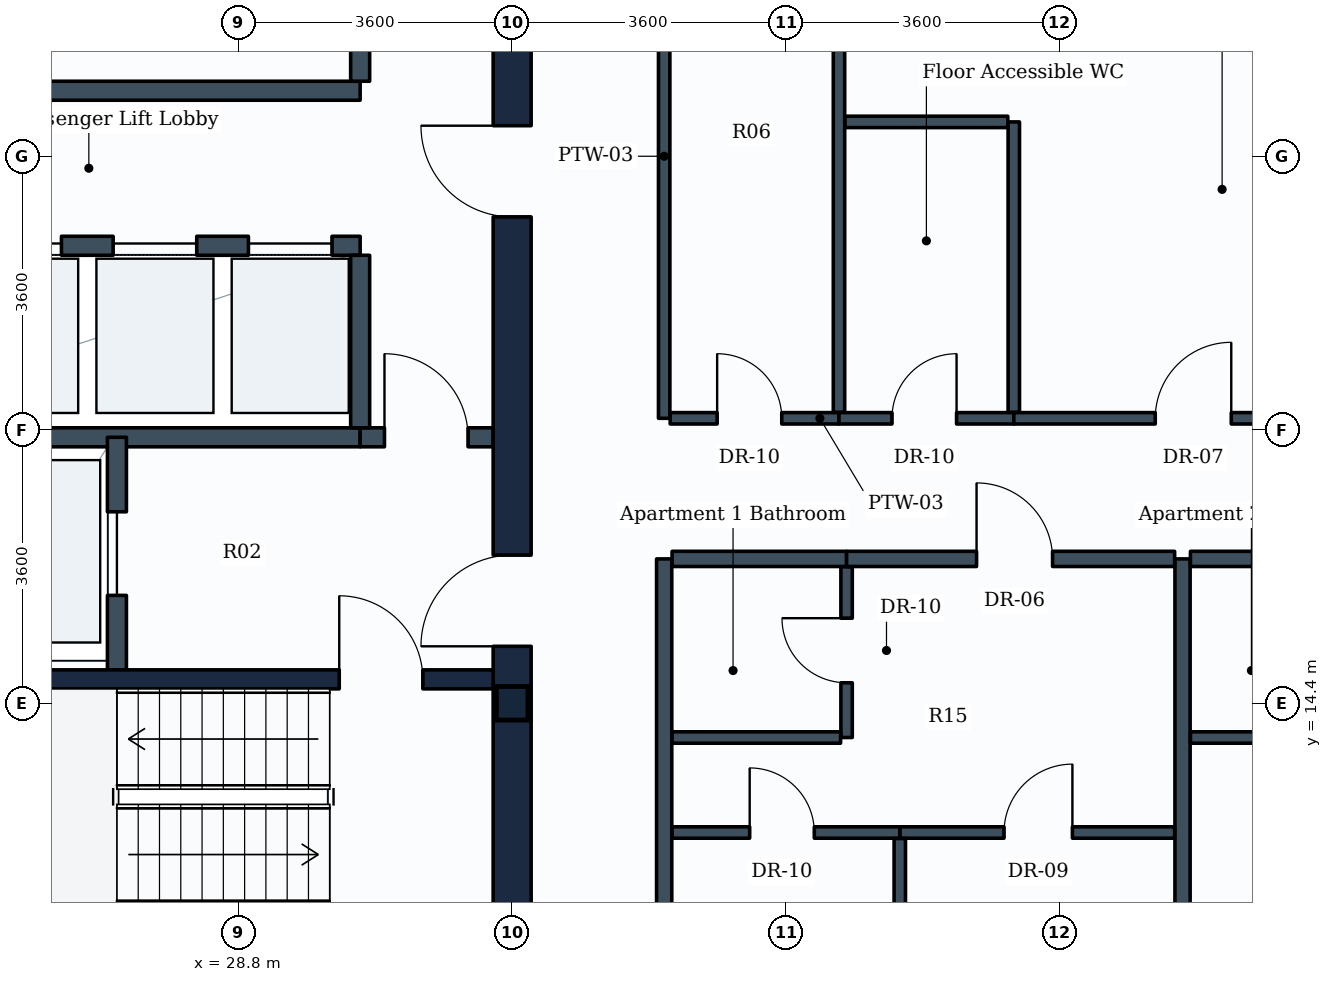
"""IFC4 building model, lengths in metres.
Left out: names, types, materials, properties, quantities, classifications, styles, units other than length and angle.
Written with IfcOpenShell. Run it as: python <this file> out.ifc"""

import sys

from ifc_helpers import new_model, si_unit, direction, frame, frame_2d, origin, origin_2d, place, context, subcontext, project, spatial, rectangle, i_section, extrude, element, fill, save


model = new_model("IFC4")
c1 = context("Model", 3, precision=1e-05, world=origin(), true_north=direction((0.0, 1.0)))
c2 = subcontext(c1, "Body", "Model", "MODEL_VIEW")
j1 = project(units=[si_unit("LENGTHUNIT", "METRE"), si_unit("PLANEANGLEUNIT", "RADIAN")], contexts=[c1])
p1 = place(None, origin())
s1 = spatial("IfcSite", under=j1, at=p1, CompositionType="ELEMENT")
p2 = place(p1, origin())
s2 = spatial("IfcBuilding", under=s1, at=p2, CompositionType="ELEMENT")
p3 = place(p2, frame((0.0, 0.0, 135.2)))
s3 = spatial("IfcBuildingStorey", under=s2, at=p3, CompositionType="ELEMENT", Elevation=135.2)
p4 = place(p3, frame((32.4, 14.4, 0.0), z_axis=(0.0, 0.0, 1.0), x_axis=(1.0, 0.0, 0.0)))
e1 = element("IfcColumn", 1, at=p4, inside=s3, PredefinedType="COLUMN", context=c2, shape_type="SweptSolid", body=[
    extrude(i_section(OverallWidth=0.416, OverallDepth=0.442, WebThickness=0.025, FlangeThickness=0.041, FilletRadius=0.015, at=origin_2d()), origin(), (0.0, 0.0, 1.0), 3.8),
])
p5 = place(p3, frame((32.4, 10.8, 0.0), z_axis=(0.0, 0.0, 1.0), x_axis=(0.0, 1.0, 0.0)))
e2 = element("IfcWall", 2, at=p5, inside=s3, PredefinedType="SHEAR", context=c2, shape_type="SweptSolid", body=[
    extrude(rectangle(XDim=14.4, YDim=0.5, at=frame_2d((7.2, 0.0))), origin(), (0.0, 0.0, 1.0), 3.55),
])
p6 = place(p5, frame((4.35, 0.0, 0.0)))
e3 = element("IfcOpeningElement", 3, at=p6, cuts=e2, PredefinedType="OPENING", context=c2, shape_type="SweptSolid", body=[
    extrude(rectangle(XDim=1.2, YDim=2.1, at=frame_2d((0.6, 1.05))), frame((0.0, 0.26, 0.0), z_axis=(0.0, -1.0, 0.0), x_axis=(1.0, 0.0, 0.0)), (0.0, 0.0, 1.0), 0.52),
])
p7 = place(p5, frame((10.0, 0.0, 0.0)))
e4 = element("IfcOpeningElement", 4, at=p7, cuts=e2, PredefinedType="OPENING", context=c2, shape_type="SweptSolid", body=[
    extrude(rectangle(XDim=1.2, YDim=2.1, at=frame_2d((0.6, 1.05))), frame((0.0, 0.26, 0.0), z_axis=(0.0, -1.0, 0.0), x_axis=(1.0, 0.0, 0.0)), (0.0, 0.0, 1.0), 0.52),
])
p8 = place(p3, frame((23.35, 14.715, 0.0), z_axis=(0.0, 0.0, 1.0), x_axis=(1.0, 0.0, 0.0)))
e5 = element("IfcWall", 5, at=p8, inside=s3, PredefinedType="SHEAR", context=c2, shape_type="SweptSolid", body=[
    extrude(rectangle(XDim=8.8, YDim=0.25, at=frame_2d((4.4, 0.0))), origin(), (0.0, 0.0, 1.0), 3.55),
])
p9 = place(p8, frame((6.775, 0.0, 0.0)))
e6 = element("IfcOpeningElement", 6, at=p9, cuts=e5, PredefinedType="OPENING", context=c2, shape_type="SweptSolid", body=[
    extrude(rectangle(XDim=1.1, YDim=2.1, at=frame_2d((0.55, 1.05))), frame((0.0, 0.135, 0.0), z_axis=(0.0, -1.0, 0.0), x_axis=(1.0, 0.0, 0.0)), (0.0, 0.0, 1.0), 0.27),
])
p10 = place(p3, frame((21.88, 17.9, 0.0), z_axis=(0.0, 0.0, 1.0), x_axis=(1.0, 0.0, 0.0)))
e7 = element("IfcWall", 7, at=p10, inside=s3, PredefinedType="PARTITIONING", context=c2, shape_type="SweptSolid", body=[
    extrude(rectangle(XDim=8.52, YDim=0.25, at=frame_2d((4.26, 0.0))), origin(), (0.0, 0.0, 1.0), 3.535),
])
p11 = place(p3, frame((30.4, 17.9, 0.0), z_axis=(0.0, 0.0, 1.0), x_axis=(1.0, 0.0, 0.0)))
e8 = element("IfcWall", 8, at=p11, inside=s3, PredefinedType="PARTITIONING", context=c2, shape_type="SweptSolid", body=[
    extrude(rectangle(XDim=1.75, YDim=0.25, at=frame_2d((0.875, 0.0))), origin(), (0.0, 0.0, 1.0), 3.535),
])
p12 = place(p11, frame((0.32, 0.0, 0.0)))
e9 = element("IfcOpeningElement", 9, at=p12, cuts=e8, PredefinedType="OPENING", context=c2, shape_type="SweptSolid", body=[
    extrude(rectangle(XDim=1.1, YDim=2.1, at=frame_2d((0.55, 1.05))), frame((0.0, 0.135, 0.0), z_axis=(0.0, -1.0, 0.0), x_axis=(1.0, 0.0, 0.0)), (0.0, 0.0, 1.0), 0.27),
])
p13 = place(p3, frame((27.2, 14.84, 0.0), z_axis=(0.0, 0.0, 1.0), x_axis=(0.0, 1.0, 0.0)))
e10 = element("IfcWall", 10, at=p13, inside=s3, PredefinedType="PARTITIONING", context=c2, shape_type="SweptSolid", body=[
    extrude(rectangle(XDim=3.06, YDim=0.25, at=frame_2d((1.53, 0.0))), origin(), (0.0, 0.0, 1.0), 3.535),
])
p14 = place(p13, frame((0.98, 0.0, 0.0)))
e11 = element("IfcOpeningElement", 11, at=p14, cuts=e10, PredefinedType="OPENING", context=c2, shape_type="SweptSolid", body=[
    extrude(rectangle(XDim=1.1, YDim=2.1, at=frame_2d((0.55, 1.05))), frame((0.0, 0.135, 0.0), z_axis=(0.0, -1.0, 0.0), x_axis=(1.0, 0.0, 0.0)), (0.0, 0.0, 1.0), 0.27),
])
p15 = place(p3, frame((23.18, 20.42, 0.0), z_axis=(0.0, 0.0, 1.0), x_axis=(1.0, 0.0, 0.0)))
e12 = element("IfcWall", 12, at=p15, inside=s3, PredefinedType="PARTITIONING", context=c2, shape_type="SweptSolid", body=[
    extrude(rectangle(XDim=7.22, YDim=0.25, at=frame_2d((3.61, 0.0))), origin(), (0.0, 0.0, 1.0), 3.535),
])
p16 = place(p15, frame((0.41, 0.0, 0.0)))
e13 = element("IfcOpeningElement", 13, at=p16, cuts=e12, PredefinedType="OPENING", context=c2, shape_type="SweptSolid", body=[
    extrude(rectangle(XDim=1.1, YDim=2.1, at=frame_2d((0.55, 1.05))), frame((0.0, 0.135, 0.0), z_axis=(0.0, -1.0, 0.0), x_axis=(1.0, 0.0, 0.0)), (0.0, 0.0, 1.0), 0.27),
])
p17 = place(p15, frame((2.19, 0.0, 0.0)))
e14 = element("IfcOpeningElement", 14, at=p17, cuts=e12, PredefinedType="OPENING", context=c2, shape_type="SweptSolid", body=[
    extrude(rectangle(XDim=1.1, YDim=2.1, at=frame_2d((0.55, 1.05))), frame((0.0, 0.135, 0.0), z_axis=(0.0, -1.0, 0.0), x_axis=(1.0, 0.0, 0.0)), (0.0, 0.0, 1.0), 0.27),
])
p18 = place(p15, frame((3.97, 0.0, 0.0)))
e15 = element("IfcOpeningElement", 15, at=p18, cuts=e12, PredefinedType="OPENING", context=c2, shape_type="SweptSolid", body=[
    extrude(rectangle(XDim=1.1, YDim=2.1, at=frame_2d((0.55, 1.05))), frame((0.0, 0.135, 0.0), z_axis=(0.0, -1.0, 0.0), x_axis=(1.0, 0.0, 0.0)), (0.0, 0.0, 1.0), 0.27),
])
p19 = place(p15, frame((5.75, 0.0, 0.0)))
e16 = element("IfcOpeningElement", 16, at=p19, cuts=e12, PredefinedType="OPENING", context=c2, shape_type="SweptSolid", body=[
    extrude(rectangle(XDim=1.1, YDim=2.1, at=frame_2d((0.55, 1.05))), frame((0.0, 0.135, 0.0), z_axis=(0.0, -1.0, 0.0), x_axis=(1.0, 0.0, 0.0)), (0.0, 0.0, 1.0), 0.27),
])
p20 = place(p3, frame((30.4, 18.025, 0.0), z_axis=(0.0, 0.0, 1.0), x_axis=(0.0, 1.0, 0.0)))
e17 = element("IfcWall", 17, at=p20, inside=s3, PredefinedType="PARTITIONING", context=c2, shape_type="SweptSolid", body=[
    extrude(rectangle(XDim=2.27, YDim=0.25, at=frame_2d((1.135, 0.0))), origin(), (0.0, 0.0, 1.0), 3.535),
])
p21 = place(p3, frame((23.18, 22.46, 0.0), z_axis=(0.0, 0.0, 1.0), x_axis=(1.0, 0.0, 0.0)))
e18 = element("IfcWall", 18, at=p21, inside=s3, PredefinedType="PARTITIONING", context=c2, shape_type="SweptSolid", body=[
    extrude(rectangle(XDim=7.22, YDim=0.25, at=frame_2d((3.61, 0.0))), origin(), (0.0, 0.0, 1.0), 3.535),
])
p22 = place(p3, frame((30.4, 22.585, 0.0), z_axis=(0.0, 0.0, 1.0), x_axis=(0.0, 1.0, 0.0)))
e19 = element("IfcWall", 19, at=p22, inside=s3, PredefinedType="PARTITIONING", context=c2, shape_type="SweptSolid", body=[
    extrude(rectangle(XDim=2.315, YDim=0.25, at=frame_2d((1.157, 0.0))), origin(), (0.0, 0.0, 1.0), 3.535),
])
p23 = place(p3, frame((34.4, 18.15, 0.0), z_axis=(0.0, 0.0, 1.0), x_axis=(0.0, 1.0, 0.0)))
e20 = element("IfcWall", 20, at=p23, inside=s3, PredefinedType="PARTITIONING", context=c2, shape_type="SweptSolid", body=[
    extrude(rectangle(XDim=6.896, YDim=0.15, at=frame_2d((3.448, 0.0))), origin(), (0.0, 0.0, 1.0), 2.93),
])
p24 = place(p3, frame((34.479, 18.15, 0.0), z_axis=(0.0, 0.0, 1.0), x_axis=(1.0, 0.0, 0.0)))
e21 = element("IfcWall", 21, at=p24, inside=s3, PredefinedType="PARTITIONING", context=c2, shape_type="SweptSolid", body=[
    extrude(rectangle(XDim=2.221, YDim=0.15, at=frame_2d((1.11, 0.0))), origin(), (0.0, 0.0, 1.0), 3.08),
])
p25 = place(p24, frame((0.618, 0.0, 0.0)))
e22 = element("IfcOpeningElement", 22, at=p25, cuts=e21, PredefinedType="OPENING", context=c2, shape_type="SweptSolid", body=[
    extrude(rectangle(XDim=0.85, YDim=2.1, at=frame_2d((0.425, 1.05))), frame((0.0, 0.085, 0.0), z_axis=(0.0, -1.0, 0.0), x_axis=(1.0, 0.0, 0.0)), (0.0, 0.0, 1.0), 0.17),
])
p26 = place(p3, frame((36.7, 18.229, 0.0), z_axis=(0.0, 0.0, 1.0), x_axis=(0.0, 1.0, 0.0)))
e23 = element("IfcWall", 23, at=p26, inside=s3, PredefinedType="PARTITIONING", context=c2, shape_type="SweptSolid", body=[
    extrude(rectangle(XDim=6.817, YDim=0.15, at=frame_2d((3.408, 0.0))), origin(), (0.0, 0.0, 1.0), 2.93),
])
p27 = place(p3, frame((36.7, 18.15, 0.0), z_axis=(0.0, 0.0, 1.0), x_axis=(1.0, 0.0, 0.0)))
e24 = element("IfcWall", 24, at=p27, inside=s3, PredefinedType="PARTITIONING", context=c2, shape_type="SweptSolid", body=[
    extrude(rectangle(XDim=2.3, YDim=0.15, at=frame_2d((1.15, 0.0))), origin(), (0.0, 0.0, 1.0), 3.08),
])
p28 = place(p27, frame((0.697, 0.0, 0.0)))
e25 = element("IfcOpeningElement", 25, at=p28, cuts=e24, PredefinedType="OPENING", context=c2, shape_type="SweptSolid", body=[
    extrude(rectangle(XDim=0.85, YDim=2.1, at=frame_2d((0.425, 1.05))), frame((0.0, 0.085, 0.0), z_axis=(0.0, -1.0, 0.0), x_axis=(1.0, 0.0, 0.0)), (0.0, 0.0, 1.0), 0.17),
])
p29 = place(p3, frame((39.0, 18.229, 0.0), z_axis=(0.0, 0.0, 1.0), x_axis=(0.0, 1.0, 0.0)))
e26 = element("IfcWall", 26, at=p29, inside=s3, PredefinedType="PARTITIONING", context=c2, shape_type="SweptSolid", body=[
    extrude(rectangle(XDim=3.821, YDim=0.15, at=frame_2d((1.911, 0.0))), origin(), (0.0, 0.0, 1.0), 3.08),
])
p30 = place(p3, frame((36.779, 22.05, 0.0), z_axis=(0.0, 0.0, 1.0), x_axis=(1.0, 0.0, 0.0)))
e27 = element("IfcWall", 27, at=p30, inside=s3, PredefinedType="PARTITIONING", context=c2, shape_type="SweptSolid", body=[
    extrude(rectangle(XDim=2.142, YDim=0.15, at=frame_2d((1.071, 0.0))), origin(), (0.0, 0.0, 1.0), 3.535),
])
p31 = place(p3, frame((34.4, 5.7, 0.0), z_axis=(0.0, 0.0, 1.0), x_axis=(0.0, 1.0, 0.0)))
e28 = element("IfcWall", 28, at=p31, inside=s3, PredefinedType="PARTITIONING", context=c2, shape_type="SweptSolid", body=[
    extrude(rectangle(XDim=10.6, YDim=0.2, at=frame_2d((5.3, 0.0))), origin(), (0.0, 0.0, 1.0), 3.17),
])
p32 = place(p3, frame((41.22, 5.7, 0.0), z_axis=(0.0, 0.0, 1.0), x_axis=(0.0, 1.0, 0.0)))
e29 = element("IfcWall", 29, at=p32, inside=s3, PredefinedType="PARTITIONING", context=c2, shape_type="SweptSolid", body=[
    extrude(rectangle(XDim=10.6, YDim=0.2, at=frame_2d((5.3, 0.0))), origin(), (0.0, 0.0, 1.0), 3.13),
])
p33 = place(p3, frame((34.504, 16.3, 0.0), z_axis=(0.0, 0.0, 1.0), x_axis=(1.0, 0.0, 0.0)))
e30 = element("IfcWall", 30, at=p33, inside=s3, PredefinedType="PARTITIONING", context=c2, shape_type="SweptSolid", body=[
    extrude(rectangle(XDim=2.296, YDim=0.2, at=frame_2d((1.148, 0.0))), origin(), (0.0, 0.0, 1.0), 3.22),
])
p34 = place(p3, frame((36.8, 13.95, 0.0), z_axis=(0.0, 0.0, 1.0), x_axis=(0.0, 1.0, 0.0)))
e31 = element("IfcWall", 31, at=p34, inside=s3, PredefinedType="PARTITIONING", context=c2, shape_type="SweptSolid", body=[
    extrude(rectangle(XDim=2.246, YDim=0.15, at=frame_2d((1.123, 0.0))), origin(), (0.0, 0.0, 1.0), 3.17),
])
p35 = place(p34, frame((0.72, 0.0, 0.0)))
e32 = element("IfcOpeningElement", 32, at=p35, cuts=e31, PredefinedType="OPENING", context=c2, shape_type="SweptSolid", body=[
    extrude(rectangle(XDim=0.85, YDim=2.1, at=frame_2d((0.425, 1.05))), frame((0.0, 0.085, 0.0), z_axis=(0.0, -1.0, 0.0), x_axis=(1.0, 0.0, 0.0)), (0.0, 0.0, 1.0), 0.17),
])
p36 = place(p3, frame((34.504, 13.95, 0.0), z_axis=(0.0, 0.0, 1.0), x_axis=(1.0, 0.0, 0.0)))
e33 = element("IfcWall", 33, at=p36, inside=s3, PredefinedType="PARTITIONING", context=c2, shape_type="SweptSolid", body=[
    extrude(rectangle(XDim=2.217, YDim=0.15, at=frame_2d((1.108, 0.0))), origin(), (0.0, 0.0, 1.0), 3.22),
])
p37 = place(p3, frame((36.8, 16.3, 0.0), z_axis=(0.0, 0.0, 1.0), x_axis=(1.0, 0.0, 0.0)))
e34 = element("IfcWall", 34, at=p37, inside=s3, PredefinedType="PARTITIONING", context=c2, shape_type="SweptSolid", body=[
    extrude(rectangle(XDim=4.316, YDim=0.2, at=frame_2d((2.158, 0.0))), origin(), (0.0, 0.0, 1.0), 3.17),
])
p38 = place(p37, frame((1.71, 0.0, 0.0)))
e35 = element("IfcOpeningElement", 35, at=p38, cuts=e34, PredefinedType="OPENING", context=c2, shape_type="SweptSolid", body=[
    extrude(rectangle(XDim=1.0, YDim=2.1, at=frame_2d((0.5, 1.05))), frame((0.0, 0.11, 0.0), z_axis=(0.0, -1.0, 0.0), x_axis=(1.0, 0.0, 0.0)), (0.0, 0.0, 1.0), 0.22),
])
p39 = place(p3, frame((37.5, 12.7, 0.0), z_axis=(0.0, 0.0, 1.0), x_axis=(1.0, 0.0, 0.0)))
e36 = element("IfcWall", 36, at=p39, inside=s3, PredefinedType="PARTITIONING", context=c2, shape_type="SweptSolid", body=[
    extrude(rectangle(XDim=3.616, YDim=0.15, at=frame_2d((1.808, 0.0))), origin(), (0.0, 0.0, 1.0), 3.17),
])
p40 = place(p39, frame((1.371, 0.0, 0.0)))
e37 = element("IfcOpeningElement", 37, at=p40, cuts=e36, PredefinedType="OPENING", context=c2, shape_type="SweptSolid", body=[
    extrude(rectangle(XDim=0.9, YDim=2.1, at=frame_2d((0.45, 1.05))), frame((0.0, 0.085, 0.0), z_axis=(0.0, -1.0, 0.0), x_axis=(1.0, 0.0, 0.0)), (0.0, 0.0, 1.0), 0.17),
])
p41 = place(p3, frame((34.504, 12.7, 0.0), z_axis=(0.0, 0.0, 1.0), x_axis=(1.0, 0.0, 0.0)))
e38 = element("IfcWall", 38, at=p41, inside=s3, PredefinedType="PARTITIONING", context=c2, shape_type="SweptSolid", body=[
    extrude(rectangle(XDim=2.996, YDim=0.15, at=frame_2d((1.498, 0.0))), origin(), (0.0, 0.0, 1.0), 3.22),
])
p42 = place(p41, frame((1.021, 0.0, 0.0)))
e39 = element("IfcOpeningElement", 39, at=p42, cuts=e38, PredefinedType="OPENING", context=c2, shape_type="SweptSolid", body=[
    extrude(rectangle(XDim=0.85, YDim=2.1, at=frame_2d((0.425, 1.05))), frame((0.0, 0.085, 0.0), z_axis=(0.0, -1.0, 0.0), x_axis=(1.0, 0.0, 0.0)), (0.0, 0.0, 1.0), 0.17),
])
p43 = place(p3, frame((37.5, 5.7, 0.0), z_axis=(0.0, 0.0, 1.0), x_axis=(0.0, 1.0, 0.0)))
e40 = element("IfcWall", 40, at=p43, inside=s3, PredefinedType="PARTITIONING", context=c2, shape_type="SweptSolid", body=[
    extrude(rectangle(XDim=6.921, YDim=0.15, at=frame_2d((3.46, 0.0))), origin(), (0.0, 0.0, 1.0), 3.08),
])
p44 = place(p3, frame((41.324, 16.3, 0.0), z_axis=(0.0, 0.0, 1.0), x_axis=(1.0, 0.0, 0.0)))
e41 = element("IfcWall", 41, at=p44, inside=s3, PredefinedType="PARTITIONING", context=c2, shape_type="SweptSolid", body=[
    extrude(rectangle(XDim=2.296, YDim=0.2, at=frame_2d((1.148, 0.0))), origin(), (0.0, 0.0, 1.0), 3.18),
])
p45 = place(p3, frame((41.324, 13.95, 0.0), z_axis=(0.0, 0.0, 1.0), x_axis=(1.0, 0.0, 0.0)))
e42 = element("IfcWall", 42, at=p45, inside=s3, PredefinedType="PARTITIONING", context=c2, shape_type="SweptSolid", body=[
    extrude(rectangle(XDim=2.217, YDim=0.15, at=frame_2d((1.108, 0.0))), origin(), (0.0, 0.0, 1.0), 3.18),
])
p46 = place(p3, frame((39.0, 18.15, 0.0), z_axis=(0.0, 0.0, 1.0), x_axis=(1.0, 0.0, 0.0)))
e43 = element("IfcWall", 43, at=p46, inside=s3, PredefinedType="PARTITIONING", context=c2, shape_type="SweptSolid", body=[
    extrude(rectangle(XDim=4.696, YDim=0.15, at=frame_2d((2.348, 0.0))), origin(), (0.0, 0.0, 1.0), 3.08),
])
p47 = place(p46, frame((1.861, 0.0, 0.0)))
e44 = element("IfcOpeningElement", 44, at=p47, cuts=e43, PredefinedType="OPENING", context=c2, shape_type="SweptSolid", body=[
    extrude(rectangle(XDim=1.0, YDim=2.1, at=frame_2d((0.5, 1.05))), frame((0.0, 0.085, 0.0), z_axis=(0.0, -1.0, 0.0), x_axis=(1.0, 0.0, 0.0)), (0.0, 0.0, 1.0), 0.17),
])
p48 = place(p9, origin())
e45 = element("IfcDoor", 45, at=p48, inside=s3, OperationType="SINGLE_SWING_LEFT", PredefinedType="DOOR", context=c2, shape_type="SweptSolid", body=[
    extrude(rectangle(XDim=1.1, YDim=2.1, at=frame_2d((0.55, 1.05))), frame((0.0, 0.025, 0.0), z_axis=(0.0, -1.0, 0.0), x_axis=(1.0, 0.0, 0.0)), (0.0, 0.0, 1.0), 0.05),
])
fill(e6, e45)
p49 = place(p14, origin())
e46 = element("IfcDoor", 46, at=p49, inside=s3, OperationType="SLIDING_TO_LEFT", PredefinedType="DOOR", context=c2, shape_type="SweptSolid", body=[
    extrude(rectangle(XDim=1.1, YDim=2.1, at=frame_2d((0.55, 1.05))), frame((0.0, 0.025, 0.0), z_axis=(0.0, -1.0, 0.0), x_axis=(1.0, 0.0, 0.0)), (0.0, 0.0, 1.0), 0.05),
])
fill(e11, e46)
p50 = place(p6, origin())
e47 = element("IfcDoor", 47, at=p50, inside=s3, OperationType="SINGLE_SWING_LEFT", PredefinedType="DOOR", context=c2, shape_type="SweptSolid", body=[
    extrude(rectangle(XDim=1.2, YDim=2.1, at=frame_2d((0.6, 1.05))), frame((0.0, 0.025, 0.0), z_axis=(0.0, -1.0, 0.0), x_axis=(1.0, 0.0, 0.0)), (0.0, 0.0, 1.0), 0.05),
])
fill(e3, e47)
p51 = place(p12, origin())
e48 = element("IfcDoor", 48, at=p51, inside=s3, OperationType="SINGLE_SWING_LEFT", PredefinedType="DOOR", context=c2, shape_type="SweptSolid", body=[
    extrude(rectangle(XDim=1.1, YDim=2.1, at=frame_2d((0.55, 1.05))), frame((0.0, 0.025, 0.0), z_axis=(0.0, -1.0, 0.0), x_axis=(1.0, 0.0, 0.0)), (0.0, 0.0, 1.0), 0.05),
])
fill(e9, e48)
p52 = place(p17, origin())
e49 = element("IfcDoor", 49, at=p52, inside=s3, OperationType="SLIDING_TO_LEFT", PredefinedType="DOOR", context=c2, shape_type="SweptSolid", body=[
    extrude(rectangle(XDim=1.1, YDim=2.1, at=frame_2d((0.55, 1.05))), frame((0.0, 0.025, 0.0), z_axis=(0.0, -1.0, 0.0), x_axis=(1.0, 0.0, 0.0)), (0.0, 0.0, 1.0), 0.05),
])
fill(e14, e49)
p53 = place(p18, origin())
e50 = element("IfcDoor", 50, at=p53, inside=s3, OperationType="SLIDING_TO_LEFT", PredefinedType="DOOR", context=c2, shape_type="SweptSolid", body=[
    extrude(rectangle(XDim=1.1, YDim=2.1, at=frame_2d((0.55, 1.05))), frame((0.0, 0.025, 0.0), z_axis=(0.0, -1.0, 0.0), x_axis=(1.0, 0.0, 0.0)), (0.0, 0.0, 1.0), 0.05),
])
fill(e15, e50)
p54 = place(p19, origin())
e51 = element("IfcDoor", 51, at=p54, inside=s3, OperationType="SLIDING_TO_LEFT", PredefinedType="DOOR", context=c2, shape_type="SweptSolid", body=[
    extrude(rectangle(XDim=1.1, YDim=2.1, at=frame_2d((0.55, 1.05))), frame((0.0, 0.025, 0.0), z_axis=(0.0, -1.0, 0.0), x_axis=(1.0, 0.0, 0.0)), (0.0, 0.0, 1.0), 0.05),
])
fill(e16, e51)
p55 = place(p7, origin())
e52 = element("IfcDoor", 52, at=p55, inside=s3, OperationType="SINGLE_SWING_RIGHT", PredefinedType="DOOR", context=c2, shape_type="SweptSolid", body=[
    extrude(rectangle(XDim=1.2, YDim=2.1, at=frame_2d((0.6, 1.05))), frame((0.0, 0.025, 0.0), z_axis=(0.0, -1.0, 0.0), x_axis=(1.0, 0.0, 0.0)), (0.0, 0.0, 1.0), 0.05),
])
fill(e4, e52)
p56 = place(p25, origin())
e53 = element("IfcDoor", 53, at=p56, inside=s3, OperationType="SINGLE_SWING_LEFT", PredefinedType="DOOR", context=c2, shape_type="SweptSolid", body=[
    extrude(rectangle(XDim=0.85, YDim=2.1, at=frame_2d((0.425, 1.05))), frame((0.0, 0.025, 0.0), z_axis=(0.0, -1.0, 0.0), x_axis=(1.0, 0.0, 0.0)), (0.0, 0.0, 1.0), 0.05),
])
fill(e22, e53)
p57 = place(p28, origin())
e54 = element("IfcDoor", 54, at=p57, inside=s3, OperationType="SINGLE_SWING_RIGHT", PredefinedType="DOOR", context=c2, shape_type="SweptSolid", body=[
    extrude(rectangle(XDim=0.85, YDim=2.1, at=frame_2d((0.425, 1.05))), frame((0.0, 0.025, 0.0), z_axis=(0.0, -1.0, 0.0), x_axis=(1.0, 0.0, 0.0)), (0.0, 0.0, 1.0), 0.05),
])
fill(e25, e54)
p58 = place(p35, origin())
e55 = element("IfcDoor", 55, at=p58, inside=s3, OperationType="SINGLE_SWING_RIGHT", PredefinedType="DOOR", context=c2, shape_type="SweptSolid", body=[
    extrude(rectangle(XDim=0.85, YDim=2.1, at=frame_2d((0.425, 1.05))), frame((0.0, 0.025, 0.0), z_axis=(0.0, -1.0, 0.0), x_axis=(1.0, 0.0, 0.0)), (0.0, 0.0, 1.0), 0.05),
])
fill(e32, e55)
p59 = place(p38, origin())
e56 = element("IfcDoor", 56, at=p59, inside=s3, OperationType="SINGLE_SWING_LEFT", PredefinedType="DOOR", context=c2, shape_type="SweptSolid", body=[
    extrude(rectangle(XDim=1.0, YDim=2.1, at=frame_2d((0.5, 1.05))), frame((0.0, 0.025, 0.0), z_axis=(0.0, -1.0, 0.0), x_axis=(1.0, 0.0, 0.0)), (0.0, 0.0, 1.0), 0.05),
])
fill(e35, e56)
p60 = place(p40, origin())
e57 = element("IfcDoor", 57, at=p60, inside=s3, OperationType="SINGLE_SWING_RIGHT", PredefinedType="DOOR", context=c2, shape_type="SweptSolid", body=[
    extrude(rectangle(XDim=0.9, YDim=2.1, at=frame_2d((0.45, 1.05))), frame((0.0, 0.025, 0.0), z_axis=(0.0, -1.0, 0.0), x_axis=(1.0, 0.0, 0.0)), (0.0, 0.0, 1.0), 0.05),
])
fill(e37, e57)
p61 = place(p42, origin())
e58 = element("IfcDoor", 58, at=p61, inside=s3, OperationType="SINGLE_SWING_LEFT", PredefinedType="DOOR", context=c2, shape_type="SweptSolid", body=[
    extrude(rectangle(XDim=0.85, YDim=2.1, at=frame_2d((0.425, 1.05))), frame((0.0, 0.025, 0.0), z_axis=(0.0, -1.0, 0.0), x_axis=(1.0, 0.0, 0.0)), (0.0, 0.0, 1.0), 0.05),
])
fill(e39, e58)
p62 = place(p47, origin())
e59 = element("IfcDoor", 59, at=p62, inside=s3, OperationType="SINGLE_SWING_RIGHT", PredefinedType="DOOR", context=c2, shape_type="SweptSolid", body=[
    extrude(rectangle(XDim=1.0, YDim=2.1, at=frame_2d((0.5, 1.05))), frame((0.0, 0.025, 0.0), z_axis=(0.0, -1.0, 0.0), x_axis=(1.0, 0.0, 0.0)), (0.0, 0.0, 1.0), 0.05),
])
fill(e44, e59)
save(model, sys.argv[1])
